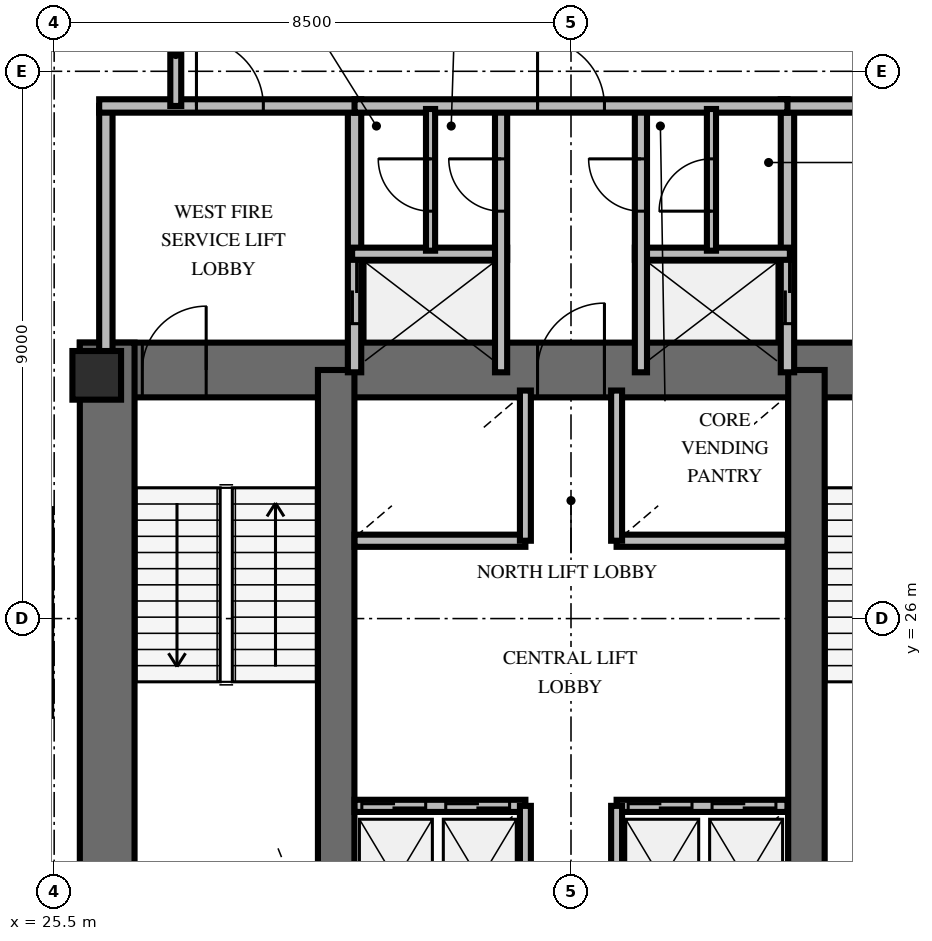
"""IFC4 building model, lengths in metres.
Left out: names, types, materials, properties, quantities, classifications, styles, units other than length and angle.
Written with IfcOpenShell. Run it as: python <this file> out.ifc"""

import sys

from ifc_helpers import new_model, si_unit, direction, frame, frame_2d, origin, origin_2d, place, context, subcontext, project, spatial, rectangle, extrude, element, fill, save


model = new_model("IFC4")
c1 = context("Model", 3, precision=1e-05, world=origin(), true_north=direction((0.0, 1.0)))
c2 = subcontext(c1, "Body", "Model", "MODEL_VIEW")
j1 = project(units=[si_unit("LENGTHUNIT", "METRE"), si_unit("PLANEANGLEUNIT", "RADIAN")], contexts=[c1])
p1 = place(None, origin())
s1 = spatial("IfcSite", under=j1, at=p1, CompositionType="ELEMENT")
p2 = place(p1, origin())
s2 = spatial("IfcBuilding", under=s1, at=p2, CompositionType="ELEMENT")
p3 = place(p2, frame((0.0, 0.0, 72.0)))
s3 = spatial("IfcBuildingStorey", under=s2, at=p3, CompositionType="ELEMENT", Elevation=72.0)
p4 = place(p3, frame((25.922, 30.088, 0.0), z_axis=(0.0, 0.0, 1.0), x_axis=(1.0, 0.0, 0.0)))
e1 = element("IfcWall", 1, at=p4, inside=s3, PredefinedType="SHEAR", context=c2, shape_type="SweptSolid", body=[
    extrude(rectangle(XDim=16.166, YDim=0.9, at=frame_2d((8.083, 0.0))), origin(), (0.0, 0.0, 1.0), 4.2),
])
p5 = place(p4, frame((1.028, 0.0, 0.0)))
e2 = element("IfcOpeningElement", 2, at=p5, cuts=e1, PredefinedType="OPENING", context=c2, shape_type="SweptSolid", body=[
    extrude(rectangle(XDim=1.05, YDim=2.15, at=frame_2d((0.525, 1.075))), frame((0.0, 0.46, 0.0), z_axis=(0.0, -1.0, 0.0), x_axis=(1.0, 0.0, 0.0)), (0.0, 0.0, 1.0), 0.92),
])
p6 = place(p4, frame((14.078, 0.0, 0.0)))
e3 = element("IfcOpeningElement", 3, at=p6, cuts=e1, PredefinedType="OPENING", context=c2, shape_type="SweptSolid", body=[
    extrude(rectangle(XDim=1.05, YDim=2.15, at=frame_2d((0.525, 1.075))), frame((0.0, 0.46, 0.0), z_axis=(0.0, -1.0, 0.0), x_axis=(1.0, 0.0, 0.0)), (0.0, 0.0, 1.0), 0.92),
])
p7 = place(p4, frame((7.528, 0.0, 0.0)))
e4 = element("IfcOpeningElement", 4, at=p7, cuts=e1, PredefinedType="OPENING", context=c2, shape_type="SweptSolid", body=[
    extrude(rectangle(XDim=1.1, YDim=2.15, at=frame_2d((0.55, 1.075))), frame((0.0, 0.46, 0.0), z_axis=(0.0, -1.0, 0.0), x_axis=(1.0, 0.0, 0.0)), (0.0, 0.0, 1.0), 0.92),
])
p8 = place(p3, frame((26.372, 19.662, 0.0), z_axis=(0.0, 0.0, 1.0), x_axis=(0.0, 1.0, 0.0)))
e5 = element("IfcWall", 5, at=p8, inside=s3, PredefinedType="SHEAR", context=c2, shape_type="SweptSolid", body=[
    extrude(rectangle(XDim=10.876, YDim=0.9, at=frame_2d((5.438, 0.0))), origin(), (0.0, 0.0, 1.0), 4.2),
])
for number, where, z_axis, x_axis in (
    (6, (30.138, 20.112, 0.0), (0.0, 0.0, 1.0), (0.0, 1.0, 0.0)),
    (7, (37.872, 20.112, 0.0), (0.0, 0.0, 1.0), (0.0, 1.0, 0.0)),
):
    element("IfcWall", number, at=place(p3, frame(where, z_axis=z_axis, x_axis=x_axis)), inside=s3, PredefinedType="SHEAR", context=c2, shape_type="SweptSolid", body=[
        extrude(rectangle(XDim=9.976, YDim=0.6, at=frame_2d((4.988, 0.0))), origin(), (0.0, 0.0, 1.0), 4.2),
    ])
p9 = place(p3, frame((26.2, 30.0, 0.0), z_axis=(0.0, 0.0, 1.0), x_axis=(1.0, 0.0, 0.0)))
e8 = element("IfcColumn", 8, at=p9, inside=s3, PredefinedType="PILASTER", context=c2, shape_type="SweptSolid", body=[
    extrude(rectangle(XDim=0.8, YDim=0.8, at=origin_2d()), origin(), (0.0, 0.0, 1.0), 4.2),
])
p10 = place(p3, frame((26.35, 30.05, 0.0), z_axis=(0.0, 0.0, 1.0), x_axis=(0.0, 1.0, 0.0)))
e9 = element("IfcWall", 9, at=p10, inside=s3, PredefinedType="SOLIDWALL", context=c2, shape_type="SweptSolid", body=[
    extrude(rectangle(XDim=4.38, YDim=0.22, at=frame_2d((2.19, 0.0))), origin(), (0.0, 0.0, 1.0), 3.0),
])
p11 = place(p3, frame((30.44, 30.05, 0.0), z_axis=(0.0, 0.0, 1.0), x_axis=(0.0, 1.0, 0.0)))
e10 = element("IfcWall", 10, at=p11, inside=s3, PredefinedType="SOLIDWALL", context=c2, shape_type="SweptSolid", body=[
    extrude(rectangle(XDim=4.38, YDim=0.22, at=frame_2d((2.19, 0.0))), origin(), (0.0, 0.0, 1.0), 3.0),
])
p12 = place(p11, frame((0.8, 0.0, 0.0)))
e11 = element("IfcOpeningElement", 11, at=p12, cuts=e10, PredefinedType="OPENING", context=c2, shape_type="SweptSolid", body=[
    extrude(rectangle(XDim=1.05, YDim=2.1, at=frame_2d((0.525, 1.05))), frame((0.0, 0.12, 0.0), z_axis=(0.0, -1.0, 0.0), x_axis=(1.0, 0.0, 0.0)), (0.0, 0.0, 1.0), 0.24),
])
p13 = place(p3, frame((26.24, 34.43, 0.0), z_axis=(0.0, 0.0, 1.0), x_axis=(1.0, 0.0, 0.0)))
e12 = element("IfcWall", 12, at=p13, inside=s3, PredefinedType="SOLIDWALL", context=c2, shape_type="SweptSolid", body=[
    extrude(rectangle(XDim=4.31, YDim=0.22, at=frame_2d((2.155, 0.0))), origin(), (0.0, 0.0, 1.0), 3.0),
])
p14 = place(p13, frame((1.6, 0.0, 0.0)))
e13 = element("IfcOpeningElement", 13, at=p14, cuts=e12, PredefinedType="OPENING", context=c2, shape_type="SweptSolid", body=[
    extrude(rectangle(XDim=1.1, YDim=2.15, at=frame_2d((0.55, 1.075))), frame((0.0, 0.12, 0.0), z_axis=(0.0, -1.0, 0.0), x_axis=(1.0, 0.0, 0.0)), (0.0, 0.0, 1.0), 0.24),
])
p15 = place(p3, frame((30.4, 32.0, 0.0), z_axis=(0.0, 0.0, 1.0), x_axis=(1.0, 0.0, 0.0)))
e14 = element("IfcWall", 14, at=p15, inside=s3, PredefinedType="SOLIDWALL", context=c2, shape_type="SweptSolid", body=[
    extrude(rectangle(XDim=2.55, YDim=0.2, at=frame_2d((1.275, 0.0))), origin(), (0.0, 0.0, 1.0), 3.0),
])
p16 = place(p3, frame((32.85, 30.05, 0.0), z_axis=(0.0, 0.0, 1.0), x_axis=(0.0, 1.0, 0.0)))
e15 = element("IfcWall", 15, at=p16, inside=s3, PredefinedType="SOLIDWALL", context=c2, shape_type="SweptSolid", body=[
    extrude(rectangle(XDim=4.38, YDim=0.2, at=frame_2d((2.19, 0.0))), origin(), (0.0, 0.0, 1.0), 3.0),
])
p17 = place(p16, frame((2.65, 0.0, 0.0)))
e16 = element("IfcOpeningElement", 16, at=p17, cuts=e15, PredefinedType="OPENING", context=c2, shape_type="SweptSolid", body=[
    extrude(rectangle(XDim=0.86, YDim=2.05, at=frame_2d((0.43, 1.025))), frame((0.0, 0.11, 0.0), z_axis=(0.0, -1.0, 0.0), x_axis=(1.0, 0.0, 0.0)), (0.0, 0.0, 1.0), 0.22),
])
p18 = place(p3, frame((37.56, 30.05, 0.0), z_axis=(0.0, 0.0, 1.0), x_axis=(0.0, 1.0, 0.0)))
e17 = element("IfcWall", 17, at=p18, inside=s3, PredefinedType="SOLIDWALL", context=c2, shape_type="SweptSolid", body=[
    extrude(rectangle(XDim=4.38, YDim=0.22, at=frame_2d((2.19, 0.0))), origin(), (0.0, 0.0, 1.0), 3.0),
])
p19 = place(p18, frame((0.8, 0.0, 0.0)))
e18 = element("IfcOpeningElement", 18, at=p19, cuts=e17, PredefinedType="OPENING", context=c2, shape_type="SweptSolid", body=[
    extrude(rectangle(XDim=1.05, YDim=2.1, at=frame_2d((0.525, 1.05))), frame((0.0, 0.12, 0.0), z_axis=(0.0, -1.0, 0.0), x_axis=(1.0, 0.0, 0.0)), (0.0, 0.0, 1.0), 0.24),
])
p20 = place(p3, frame((37.45, 34.43, 0.0), z_axis=(0.0, 0.0, 1.0), x_axis=(1.0, 0.0, 0.0)))
e19 = element("IfcWall", 19, at=p20, inside=s3, PredefinedType="SOLIDWALL", context=c2, shape_type="SweptSolid", body=[
    extrude(rectangle(XDim=4.31, YDim=0.22, at=frame_2d((2.155, 0.0))), origin(), (0.0, 0.0, 1.0), 3.0),
])
p21 = place(p20, frame((1.6, 0.0, 0.0)))
e20 = element("IfcOpeningElement", 20, at=p21, cuts=e19, PredefinedType="OPENING", context=c2, shape_type="SweptSolid", body=[
    extrude(rectangle(XDim=1.1, YDim=2.15, at=frame_2d((0.55, 1.075))), frame((0.0, 0.12, 0.0), z_axis=(0.0, -1.0, 0.0), x_axis=(1.0, 0.0, 0.0)), (0.0, 0.0, 1.0), 0.24),
])
p22 = place(p3, frame((35.05, 32.0, 0.0), z_axis=(0.0, 0.0, 1.0), x_axis=(1.0, 0.0, 0.0)))
e21 = element("IfcWall", 21, at=p22, inside=s3, PredefinedType="SOLIDWALL", context=c2, shape_type="SweptSolid", body=[
    extrude(rectangle(XDim=2.55, YDim=0.2, at=frame_2d((1.275, 0.0))), origin(), (0.0, 0.0, 1.0), 3.0),
])
p23 = place(p3, frame((35.15, 30.05, 0.0), z_axis=(0.0, 0.0, 1.0), x_axis=(0.0, 1.0, 0.0)))
e22 = element("IfcWall", 22, at=p23, inside=s3, PredefinedType="SOLIDWALL", context=c2, shape_type="SweptSolid", body=[
    extrude(rectangle(XDim=4.38, YDim=0.2, at=frame_2d((2.19, 0.0))), origin(), (0.0, 0.0, 1.0), 3.0),
])
p24 = place(p23, frame((2.65, 0.0, 0.0)))
e23 = element("IfcOpeningElement", 23, at=p24, cuts=e22, PredefinedType="OPENING", context=c2, shape_type="SweptSolid", body=[
    extrude(rectangle(XDim=0.86, YDim=2.05, at=frame_2d((0.43, 1.025))), frame((0.0, 0.11, 0.0), z_axis=(0.0, -1.0, 0.0), x_axis=(1.0, 0.0, 0.0)), (0.0, 0.0, 1.0), 0.22),
])
p25 = place(p3, frame((30.44, 34.43, 0.0), z_axis=(0.0, 0.0, 1.0), x_axis=(1.0, 0.0, 0.0)))
e24 = element("IfcWall", 24, at=p25, inside=s3, PredefinedType="SOLIDWALL", context=c2, shape_type="SweptSolid", body=[
    extrude(rectangle(XDim=7.12, YDim=0.22, at=frame_2d((3.56, 0.0))), origin(), (0.0, 0.0, 1.0), 3.0),
])
p26 = place(p25, frame((3.01, 0.0, 0.0)))
e25 = element("IfcOpeningElement", 25, at=p26, cuts=e24, PredefinedType="OPENING", context=c2, shape_type="SweptSolid", body=[
    extrude(rectangle(XDim=1.1, YDim=2.15, at=frame_2d((0.55, 1.075))), frame((0.0, 0.12, 0.0), z_axis=(0.0, -1.0, 0.0), x_axis=(1.0, 0.0, 0.0)), (0.0, 0.0, 1.0), 0.24),
])
p27 = place(p3, frame((31.69, 32.05, 0.0), z_axis=(0.0, 0.0, 1.0), x_axis=(0.0, 1.0, 0.0)))
e26 = element("IfcWall", 26, at=p27, inside=s3, PredefinedType="PARTITIONING", context=c2, shape_type="SweptSolid", body=[
    extrude(rectangle(XDim=2.33, YDim=0.15, at=frame_2d((1.165, 0.0))), origin(), (0.0, 0.0, 1.0), 3.0),
])
p28 = place(p27, frame((0.65, 0.0, 0.0)))
e27 = element("IfcOpeningElement", 27, at=p28, cuts=e26, PredefinedType="OPENING", context=c2, shape_type="SweptSolid", body=[
    extrude(rectangle(XDim=0.86, YDim=2.05, at=frame_2d((0.43, 1.025))), frame((0.0, 0.085, 0.0), z_axis=(0.0, -1.0, 0.0), x_axis=(1.0, 0.0, 0.0)), (0.0, 0.0, 1.0), 0.17),
])
p29 = place(p3, frame((36.31, 32.05, 0.0), z_axis=(0.0, 0.0, 1.0), x_axis=(0.0, 1.0, 0.0)))
e28 = element("IfcWall", 28, at=p29, inside=s3, PredefinedType="PARTITIONING", context=c2, shape_type="SweptSolid", body=[
    extrude(rectangle(XDim=2.33, YDim=0.15, at=frame_2d((1.165, 0.0))), origin(), (0.0, 0.0, 1.0), 3.0),
])
p30 = place(p29, frame((0.65, 0.0, 0.0)))
e29 = element("IfcOpeningElement", 29, at=p30, cuts=e28, PredefinedType="OPENING", context=c2, shape_type="SweptSolid", body=[
    extrude(rectangle(XDim=0.86, YDim=2.05, at=frame_2d((0.43, 1.025))), frame((0.0, 0.085, 0.0), z_axis=(0.0, -1.0, 0.0), x_axis=(1.0, 0.0, 0.0)), (0.0, 0.0, 1.0), 0.17),
])
p31 = place(p3, frame((30.44, 22.92, 0.0), z_axis=(0.0, 0.0, 1.0), x_axis=(1.0, 0.0, 0.0)))
e30 = element("IfcWall", 30, at=p31, inside=s3, PredefinedType="SOLIDWALL", context=c2, shape_type="SweptSolid", body=[
    extrude(rectangle(XDim=2.81, YDim=0.2, at=frame_2d((1.405, 0.0))), origin(), (0.0, 0.0, 1.0), 3.0),
])
p32 = place(p31, frame((0.12, 0.0, 0.0)))
e31 = element("IfcOpeningElement", 31, at=p32, cuts=e30, PredefinedType="OPENING", context=c2, shape_type="SweptSolid", body=[
    extrude(rectangle(XDim=1.05, YDim=2.1, at=frame_2d((0.525, 1.05))), frame((0.0, 0.11, 0.0), z_axis=(0.0, -1.0, 0.0), x_axis=(1.0, 0.0, 0.0)), (0.0, 0.0, 1.0), 0.22),
])
p33 = place(p31, frame((1.5, 0.0, 0.0)))
e32 = element("IfcOpeningElement", 32, at=p33, cuts=e30, PredefinedType="OPENING", context=c2, shape_type="SweptSolid", body=[
    extrude(rectangle(XDim=1.05, YDim=2.1, at=frame_2d((0.525, 1.05))), frame((0.0, 0.11, 0.0), z_axis=(0.0, -1.0, 0.0), x_axis=(1.0, 0.0, 0.0)), (0.0, 0.0, 1.0), 0.22),
])
p34 = place(p3, frame((33.25, 20.5, 0.0), z_axis=(0.0, 0.0, 1.0), x_axis=(0.0, 1.0, 0.0)))
e33 = element("IfcWall", 33, at=p34, inside=s3, PredefinedType="SOLIDWALL", context=c2, shape_type="SweptSolid", body=[
    extrude(rectangle(XDim=2.42, YDim=0.18, at=frame_2d((1.21, 0.0))), origin(), (0.0, 0.0, 1.0), 3.0),
])
p35 = place(p3, frame((34.75, 22.92, 0.0), z_axis=(0.0, 0.0, 1.0), x_axis=(1.0, 0.0, 0.0)))
e34 = element("IfcWall", 34, at=p35, inside=s3, PredefinedType="SOLIDWALL", context=c2, shape_type="SweptSolid", body=[
    extrude(rectangle(XDim=2.81, YDim=0.2, at=frame_2d((1.405, 0.0))), origin(), (0.0, 0.0, 1.0), 3.0),
])
p36 = place(p35, frame((0.19, 0.0, 0.0)))
e35 = element("IfcOpeningElement", 35, at=p36, cuts=e34, PredefinedType="OPENING", context=c2, shape_type="SweptSolid", body=[
    extrude(rectangle(XDim=1.05, YDim=2.1, at=frame_2d((0.525, 1.05))), frame((0.0, 0.11, 0.0), z_axis=(0.0, -1.0, 0.0), x_axis=(1.0, 0.0, 0.0)), (0.0, 0.0, 1.0), 0.22),
])
p37 = place(p35, frame((1.57, 0.0, 0.0)))
e36 = element("IfcOpeningElement", 36, at=p37, cuts=e34, PredefinedType="OPENING", context=c2, shape_type="SweptSolid", body=[
    extrude(rectangle(XDim=1.05, YDim=2.1, at=frame_2d((0.525, 1.05))), frame((0.0, 0.11, 0.0), z_axis=(0.0, -1.0, 0.0), x_axis=(1.0, 0.0, 0.0)), (0.0, 0.0, 1.0), 0.22),
])
p38 = place(p3, frame((34.75, 20.5, 0.0), z_axis=(0.0, 0.0, 1.0), x_axis=(0.0, 1.0, 0.0)))
e37 = element("IfcWall", 37, at=p38, inside=s3, PredefinedType="SOLIDWALL", context=c2, shape_type="SweptSolid", body=[
    extrude(rectangle(XDim=2.42, YDim=0.18, at=frame_2d((1.21, 0.0))), origin(), (0.0, 0.0, 1.0), 3.0),
])
p39 = place(p3, frame((30.44, 27.28, 0.0), z_axis=(0.0, 0.0, 1.0), x_axis=(1.0, 0.0, 0.0)))
e38 = element("IfcWall", 38, at=p39, inside=s3, PredefinedType="SOLIDWALL", context=c2, shape_type="SweptSolid", body=[
    extrude(rectangle(XDim=2.81, YDim=0.2, at=frame_2d((1.405, 0.0))), origin(), (0.0, 0.0, 1.0), 3.0),
])
p40 = place(p3, frame((33.25, 27.28, 0.0), z_axis=(0.0, 0.0, 1.0), x_axis=(0.0, 1.0, 0.0)))
e39 = element("IfcWall", 39, at=p40, inside=s3, PredefinedType="SOLIDWALL", context=c2, shape_type="SweptSolid", body=[
    extrude(rectangle(XDim=2.47, YDim=0.18, at=frame_2d((1.235, 0.0))), origin(), (0.0, 0.0, 1.0), 3.0),
])
p41 = place(p3, frame((34.75, 27.28, 0.0), z_axis=(0.0, 0.0, 1.0), x_axis=(1.0, 0.0, 0.0)))
e40 = element("IfcWall", 40, at=p41, inside=s3, PredefinedType="SOLIDWALL", context=c2, shape_type="SweptSolid", body=[
    extrude(rectangle(XDim=2.81, YDim=0.2, at=frame_2d((1.405, 0.0))), origin(), (0.0, 0.0, 1.0), 3.0),
])
p42 = place(p3, frame((34.75, 27.28, 0.0), z_axis=(0.0, 0.0, 1.0), x_axis=(0.0, 1.0, 0.0)))
e41 = element("IfcWall", 41, at=p42, inside=s3, PredefinedType="SOLIDWALL", context=c2, shape_type="SweptSolid", body=[
    extrude(rectangle(XDim=2.47, YDim=0.18, at=frame_2d((1.235, 0.0))), origin(), (0.0, 0.0, 1.0), 3.0),
])
p43 = place(p3, frame((27.5, 34.43, 0.0), z_axis=(0.0, 0.0, 1.0), x_axis=(0.0, 1.0, 0.0)))
e42 = element("IfcWall", 42, at=p43, inside=s3, PredefinedType="PARTITIONING", context=c2, shape_type="SweptSolid", body=[
    extrude(rectangle(XDim=1.693, YDim=0.18, at=frame_2d((0.846, 0.0))), origin(), (0.0, 0.0, 1.0), 3.0),
])
p44 = place(p5, origin())
e43 = element("IfcDoor", 43, at=p44, inside=s3, OperationType="SINGLE_SWING_RIGHT", PredefinedType="DOOR", context=c2, shape_type="SweptSolid", body=[
    extrude(rectangle(XDim=1.05, YDim=2.15, at=frame_2d((0.525, 1.075))), frame((0.0, 0.025, 0.0), z_axis=(0.0, -1.0, 0.0), x_axis=(1.0, 0.0, 0.0)), (0.0, 0.0, 1.0), 0.05),
])
fill(e2, e43)
p45 = place(p7, origin())
e44 = element("IfcDoor", 44, at=p45, inside=s3, OperationType="SINGLE_SWING_RIGHT", PredefinedType="DOOR", context=c2, shape_type="SweptSolid", body=[
    extrude(rectangle(XDim=1.1, YDim=2.15, at=frame_2d((0.55, 1.075))), frame((0.0, 0.025, 0.0), z_axis=(0.0, -1.0, 0.0), x_axis=(1.0, 0.0, 0.0)), (0.0, 0.0, 1.0), 0.05),
])
fill(e4, e44)
p46 = place(p14, origin())
e45 = element("IfcDoor", 45, at=p46, inside=s3, OperationType="SINGLE_SWING_LEFT", PredefinedType="DOOR", context=c2, shape_type="SweptSolid", body=[
    extrude(rectangle(XDim=1.1, YDim=2.15, at=frame_2d((0.55, 1.075))), frame((0.0, 0.025, 0.0), z_axis=(0.0, -1.0, 0.0), x_axis=(1.0, 0.0, 0.0)), (0.0, 0.0, 1.0), 0.05),
])
fill(e13, e45)
p47 = place(p12, origin())
e46 = element("IfcDoor", 46, at=p47, inside=s3, OperationType="DOUBLE_DOOR_SLIDING", PredefinedType="USERDEFINED", context=c2, shape_type="SweptSolid", body=[
    extrude(rectangle(XDim=1.05, YDim=2.1, at=frame_2d((0.525, 1.05))), frame((0.0, 0.025, 0.0), z_axis=(0.0, -1.0, 0.0), x_axis=(1.0, 0.0, 0.0)), (0.0, 0.0, 1.0), 0.05),
])
fill(e11, e46)
p48 = place(p17, origin())
e47 = element("IfcDoor", 47, at=p48, inside=s3, OperationType="SINGLE_SWING_RIGHT", PredefinedType="TRAPDOOR", context=c2, shape_type="SweptSolid", body=[
    extrude(rectangle(XDim=0.86, YDim=2.05, at=frame_2d((0.43, 1.025))), frame((0.0, 0.025, 0.0), z_axis=(0.0, -1.0, 0.0), x_axis=(1.0, 0.0, 0.0)), (0.0, 0.0, 1.0), 0.05),
])
fill(e16, e47)
p49 = place(p19, origin())
e48 = element("IfcDoor", 48, at=p49, inside=s3, OperationType="DOUBLE_DOOR_SLIDING", PredefinedType="USERDEFINED", context=c2, shape_type="SweptSolid", body=[
    extrude(rectangle(XDim=1.05, YDim=2.1, at=frame_2d((0.525, 1.05))), frame((0.0, 0.025, 0.0), z_axis=(0.0, -1.0, 0.0), x_axis=(1.0, 0.0, 0.0)), (0.0, 0.0, 1.0), 0.05),
])
fill(e18, e48)
p50 = place(p24, origin())
e49 = element("IfcDoor", 49, at=p50, inside=s3, OperationType="SINGLE_SWING_RIGHT", PredefinedType="TRAPDOOR", context=c2, shape_type="SweptSolid", body=[
    extrude(rectangle(XDim=0.86, YDim=2.05, at=frame_2d((0.43, 1.025))), frame((0.0, 0.025, 0.0), z_axis=(0.0, -1.0, 0.0), x_axis=(1.0, 0.0, 0.0)), (0.0, 0.0, 1.0), 0.05),
])
fill(e23, e49)
p51 = place(p26, origin())
e50 = element("IfcDoor", 50, at=p51, inside=s3, OperationType="SINGLE_SWING_LEFT", PredefinedType="DOOR", context=c2, shape_type="SweptSolid", body=[
    extrude(rectangle(XDim=1.1, YDim=2.15, at=frame_2d((0.55, 1.075))), frame((0.0, 0.025, 0.0), z_axis=(0.0, -1.0, 0.0), x_axis=(1.0, 0.0, 0.0)), (0.0, 0.0, 1.0), 0.05),
])
fill(e25, e50)
p52 = place(p28, origin())
e51 = element("IfcDoor", 51, at=p52, inside=s3, OperationType="SINGLE_SWING_RIGHT", PredefinedType="TRAPDOOR", context=c2, shape_type="SweptSolid", body=[
    extrude(rectangle(XDim=0.86, YDim=2.05, at=frame_2d((0.43, 1.025))), frame((0.0, 0.025, 0.0), z_axis=(0.0, -1.0, 0.0), x_axis=(1.0, 0.0, 0.0)), (0.0, 0.0, 1.0), 0.05),
])
fill(e27, e51)
p53 = place(p30, origin())
e52 = element("IfcDoor", 52, at=p53, inside=s3, OperationType="SINGLE_SWING_LEFT", PredefinedType="TRAPDOOR", context=c2, shape_type="SweptSolid", body=[
    extrude(rectangle(XDim=0.86, YDim=2.05, at=frame_2d((0.43, 1.025))), frame((0.0, 0.025, 0.0), z_axis=(0.0, -1.0, 0.0), x_axis=(1.0, 0.0, 0.0)), (0.0, 0.0, 1.0), 0.05),
])
fill(e29, e52)
p54 = place(p32, origin())
e53 = element("IfcDoor", 53, at=p54, inside=s3, OperationType="DOUBLE_DOOR_SLIDING", PredefinedType="USERDEFINED", context=c2, shape_type="SweptSolid", body=[
    extrude(rectangle(XDim=1.05, YDim=2.1, at=frame_2d((0.525, 1.05))), frame((0.0, 0.025, 0.0), z_axis=(0.0, -1.0, 0.0), x_axis=(1.0, 0.0, 0.0)), (0.0, 0.0, 1.0), 0.05),
])
fill(e31, e53)
p55 = place(p33, origin())
e54 = element("IfcDoor", 54, at=p55, inside=s3, OperationType="DOUBLE_DOOR_SLIDING", PredefinedType="USERDEFINED", context=c2, shape_type="SweptSolid", body=[
    extrude(rectangle(XDim=1.05, YDim=2.1, at=frame_2d((0.525, 1.05))), frame((0.0, 0.025, 0.0), z_axis=(0.0, -1.0, 0.0), x_axis=(1.0, 0.0, 0.0)), (0.0, 0.0, 1.0), 0.05),
])
fill(e32, e54)
p56 = place(p36, origin())
e55 = element("IfcDoor", 55, at=p56, inside=s3, OperationType="DOUBLE_DOOR_SLIDING", PredefinedType="USERDEFINED", context=c2, shape_type="SweptSolid", body=[
    extrude(rectangle(XDim=1.05, YDim=2.1, at=frame_2d((0.525, 1.05))), frame((0.0, 0.025, 0.0), z_axis=(0.0, -1.0, 0.0), x_axis=(1.0, 0.0, 0.0)), (0.0, 0.0, 1.0), 0.05),
])
fill(e35, e55)
p57 = place(p37, origin())
e56 = element("IfcDoor", 56, at=p57, inside=s3, OperationType="DOUBLE_DOOR_SLIDING", PredefinedType="USERDEFINED", context=c2, shape_type="SweptSolid", body=[
    extrude(rectangle(XDim=1.05, YDim=2.1, at=frame_2d((0.525, 1.05))), frame((0.0, 0.025, 0.0), z_axis=(0.0, -1.0, 0.0), x_axis=(1.0, 0.0, 0.0)), (0.0, 0.0, 1.0), 0.05),
])
fill(e36, e56)
save(model, sys.argv[1])
